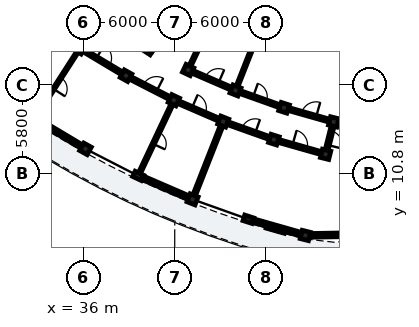
"""IFC4 building model, lengths in metres.
Left out: names, types, materials, properties, quantities, classifications, styles, units other than length and angle.
Written with IfcOpenShell. Run it as: python <this file> out.ifc"""

import sys

from ifc_helpers import new_model, si_unit, direction, frame, frame_2d, origin, origin_2d, place, context, subcontext, project, spatial, rectangle, extrude, element, fill, save


model = new_model("IFC4")
c1 = context("Model", 3, precision=1e-05, world=origin(), true_north=direction((0.0, 1.0)))
c2 = subcontext(c1, "Body", "Model", "MODEL_VIEW")
j1 = project(units=[si_unit("LENGTHUNIT", "METRE"), si_unit("PLANEANGLEUNIT", "RADIAN")], contexts=[c1])
p1 = place(None, origin())
s1 = spatial("IfcSite", under=j1, at=p1, CompositionType="ELEMENT")
p2 = place(p1, origin())
s2 = spatial("IfcBuilding", under=s1, at=p2, CompositionType="ELEMENT")
p3 = place(p2, frame((0.0, 0.0, 12.2)))
s3 = spatial("IfcBuildingStorey", under=s2, at=p3, CompositionType="ELEMENT", Elevation=12.2)
p4 = place(p3, frame((40.449, 18.709, 0.0), z_axis=(0.0, 0.0, 1.0), x_axis=(-0.838678407117, 0.544626963559, 0.0)))
e1 = element("IfcWall", 1, at=p4, inside=s3, PredefinedType="SHEAR", context=c2, shape_type="SweptSolid", body=[
    extrude(rectangle(XDim=3.42, YDim=0.25, at=frame_2d((1.71, 0.0))), origin(), (0.0, 0.0, 1.0), 3.11),
])
for number, where, z_axis, x_axis in (
    (2, (35.76, 19.042, 0.0), (0.0, 0.0, 1.0), (-0.541, -0.841, 0.0)),
    (3, (38.796, 17.227, 0.0), (0.0, 0.0, 1.0), (-0.485, -0.875, 0.0)),
    (4, (36.13, 12.417, 0.0), (0.0, 0.0, 1.0), (-0.485, -0.875, 0.0)),
    (5, (42.882, 17.604, 0.0), (0.0, 0.0, 1.0), (-0.427, -0.904, 0.0)),
    (6, (41.944, 15.614, 0.0), (0.0, 0.0, 1.0), (-0.427, -0.904, 0.0)),
):
    element("IfcColumn", number, at=place(p3, frame(where, z_axis=z_axis, x_axis=x_axis)), inside=s3, PredefinedType="COLUMN", context=c2, shape_type="SweptSolid", body=[
        extrude(rectangle(XDim=0.56, YDim=0.56, at=origin_2d()), origin(), (0.0, 0.0, 1.0), 3.105),
    ])
p5 = place(p3, frame((39.598, 10.64, 0.0), z_axis=(0.0, 0.0, 1.0), x_axis=(-0.426568739901, -0.904455145454, 0.0)))
e7 = element("IfcColumn", 7, at=p5, inside=s3, PredefinedType="PILASTER", context=c2, shape_type="SweptSolid", body=[
    extrude(rectangle(XDim=0.38, YDim=0.62, at=origin_2d()), origin(), (0.0, 0.0, 1.0), 3.105),
])
for number, where, z_axis, x_axis in (
    (8, (45.997, 16.258, 0.0), (0.0, 0.0, 1.0), (-0.367, -0.93, 0.0)),
    (9, (45.191, 14.211, 0.0), (0.0, 0.0, 1.0), (-0.367, -0.93, 0.0)),
    (10, (43.175, 9.094, 0.0), (0.0, 0.0, 1.0), (-0.367, -0.93, 0.0)),
    (11, (49.193, 15.118, 0.0), (0.0, 0.0, 1.0), (-0.305, -0.952, 0.0)),
    (12, (48.522, 13.023, 0.0), (0.0, 0.0, 1.0), (-0.305, -0.952, 0.0)),
):
    element("IfcColumn", number, at=place(p3, frame(where, z_axis=z_axis, x_axis=x_axis)), inside=s3, PredefinedType="COLUMN", context=c2, shape_type="SweptSolid", body=[
        extrude(rectangle(XDim=0.56, YDim=0.56, at=origin_2d()), origin(), (0.0, 0.0, 1.0), 3.105),
    ])
p6 = place(p3, frame((46.845, 7.785, 0.0), z_axis=(0.0, 0.0, 1.0), x_axis=(-0.304864299028, -0.952395799643, 0.0)))
e13 = element("IfcColumn", 13, at=p6, inside=s3, PredefinedType="PILASTER", context=c2, shape_type="SweptSolid", body=[
    extrude(rectangle(XDim=0.38, YDim=0.62, at=origin_2d()), origin(), (0.0, 0.0, 1.0), 3.105),
])
for number, where, z_axis, x_axis in (
    (14, (52.456, 14.19, 0.0), (0.0, 0.0, 1.0), (-0.242, -0.97, 0.0)),
    (15, (51.924, 12.055, 0.0), (0.0, 0.0, 1.0), (-0.242, -0.97, 0.0)),
    (16, (50.594, 6.719, 0.0), (0.0, 0.0, 1.0), (-0.242, -0.97, 0.0)),
):
    element("IfcColumn", number, at=place(p3, frame(where, z_axis=z_axis, x_axis=x_axis)), inside=s3, PredefinedType="COLUMN", context=c2, shape_type="SweptSolid", body=[
        extrude(rectangle(XDim=0.56, YDim=0.56, at=origin_2d()), origin(), (0.0, 0.0, 1.0), 3.105),
    ])
p7 = place(p3, frame((32.922, 14.334, 0.0), z_axis=(0.0, 0.0, 1.0), x_axis=(0.858288874148, -0.513166842766, 0.0)))
e17 = element("IfcWall", 17, at=p7, inside=s3, PredefinedType="SOLIDWALL", context=c2, shape_type="SweptSolid", body=[
    extrude(rectangle(XDim=3.487, YDim=0.245, at=frame_2d((1.743, 0.0))), origin(), (0.0, 0.0, 1.0), 2.355),
])
p8 = place(p7, frame((0.918, 0.0, 0.35)))
e18 = element("IfcOpeningElement", 18, at=p8, cuts=e17, PredefinedType="OPENING", context=c2, shape_type="SweptSolid", body=[
    extrude(rectangle(XDim=1.65, YDim=1.8, at=frame_2d((0.825, 0.9))), frame((0.0, 0.133, 0.0), z_axis=(0.0, -1.0, 0.0), x_axis=(1.0, 0.0, 0.0)), (0.0, 0.0, 1.0), 0.265),
])
p9 = place(p3, frame((39.745, 10.576, 0.0), z_axis=(0.0, 0.0, 1.0), x_axis=(0.917938367037, -0.396723019652, 0.0)))
e19 = element("IfcWall", 19, at=p9, inside=s3, PredefinedType="SOLIDWALL", context=c2, shape_type="SweptSolid", body=[
    extrude(rectangle(XDim=3.487, YDim=0.245, at=frame_2d((1.743, 0.0))), origin(), (0.0, 0.0, 1.0), 2.355),
])
p10 = place(p9, frame((1.104, 0.0, 0.55)))
e20 = element("IfcOpeningElement", 20, at=p10, cuts=e19, PredefinedType="OPENING", context=c2, shape_type="SweptSolid", body=[
    extrude(rectangle(XDim=1.28, YDim=1.52, at=frame_2d((0.64, 0.76))), frame((0.0, 0.133, 0.0), z_axis=(0.0, -1.0, 0.0), x_axis=(1.0, 0.0, 0.0)), (0.0, 0.0, 1.0), 0.265),
])
p11 = place(p3, frame((46.999, 7.741, 0.0), z_axis=(0.0, 0.0, 1.0), x_axis=(0.961871954212, -0.2735001713, 0.0)))
e21 = element("IfcWall", 21, at=p11, inside=s3, PredefinedType="SOLIDWALL", context=c2, shape_type="SweptSolid", body=[
    extrude(rectangle(XDim=3.487, YDim=0.245, at=frame_2d((1.743, 0.0))), origin(), (0.0, 0.0, 1.0), 2.355),
])
p12 = place(p11, frame((1.123, 0.0, 0.55)))
e22 = element("IfcOpeningElement", 22, at=p12, cuts=e21, PredefinedType="OPENING", context=c2, shape_type="SweptSolid", body=[
    extrude(rectangle(XDim=1.24, YDim=1.535, at=frame_2d((0.62, 0.768))), frame((0.0, 0.133, 0.0), z_axis=(0.0, -1.0, 0.0), x_axis=(1.0, 0.0, 0.0)), (0.0, 0.0, 1.0), 0.265),
])
p13 = place(p3, frame((54.501, 6.787, 0.0), z_axis=(0.0, 0.0, 1.0), x_axis=(-0.999848115368, -0.017428315893, 0.0)))
e23 = element("IfcWall", 23, at=p13, inside=s3, PredefinedType="SOLIDWALL", context=c2, shape_type="SweptSolid", body=[
    extrude(rectangle(XDim=3.908, YDim=0.245, at=frame_2d((1.954, 0.0))), origin(), (0.0, 0.0, 1.0), 2.355),
])
p14 = place(p13, frame((0.979, 0.0, 0.4)))
e24 = element("IfcOpeningElement", 24, at=p14, cuts=e23, PredefinedType="OPENING", context=c2, shape_type="SweptSolid", body=[
    extrude(rectangle(XDim=1.95, YDim=1.78, at=frame_2d((0.975, 0.89))), frame((0.0, 0.133, 0.0), z_axis=(0.0, -1.0, 0.0), x_axis=(1.0, 0.0, 0.0)), (0.0, 0.0, 1.0), 0.265),
])
p15 = place(p3, frame((35.544, 18.705, 0.0), z_axis=(0.0, 0.0, 1.0), x_axis=(-0.540959731567, -0.84104849374, 0.0)))
e25 = element("IfcWall", 25, at=p15, inside=s3, PredefinedType="PARTITIONING", context=c2, shape_type="SweptSolid", body=[
    extrude(rectangle(XDim=4.7, YDim=0.115, at=frame_2d((2.35, 0.0))), origin(), (0.0, 0.0, 1.0), 2.37),
])
p16 = place(p15, frame((1.905, 0.0, 0.0)))
e26 = element("IfcOpeningElement", 26, at=p16, cuts=e25, PredefinedType="OPENING", context=c2, shape_type="SweptSolid", body=[
    extrude(rectangle(XDim=0.89, YDim=2.1, at=frame_2d((0.445, 1.05))), frame((0.0, 0.067, 0.0), z_axis=(0.0, -1.0, 0.0), x_axis=(1.0, 0.0, 0.0)), (0.0, 0.0, 1.0), 0.135),
])
p17 = place(p3, frame((36.061, 18.862, 0.0), z_axis=(0.0, 0.0, 1.0), x_axis=(0.858281647443, -0.51317892948, 0.0)))
e27 = element("IfcWall", 27, at=p17, inside=s3, PredefinedType="PARTITIONING", context=c2, shape_type="SweptSolid", body=[
    extrude(rectangle(XDim=2.837, YDim=0.195, at=frame_2d((1.418, 0.0))), origin(), (0.0, 0.0, 1.0), 2.37),
])
p18 = place(p17, frame((0.924, 0.0, 0.0)))
e28 = element("IfcOpeningElement", 28, at=p18, cuts=e27, PredefinedType="OPENING", context=c2, shape_type="SweptSolid", body=[
    extrude(rectangle(XDim=0.99, YDim=2.16, at=frame_2d((0.495, 1.08))), frame((0.0, 0.107, 0.0), z_axis=(0.0, -1.0, 0.0), x_axis=(1.0, 0.0, 0.0)), (0.0, 0.0, 1.0), 0.215),
])
p19 = place(p3, frame((39.107, 17.067, 0.0), z_axis=(0.0, 0.0, 1.0), x_axis=(0.890030590607, -0.45590080915, 0.0)))
e29 = element("IfcWall", 29, at=p19, inside=s3, PredefinedType="PARTITIONING", context=c2, shape_type="SweptSolid", body=[
    extrude(rectangle(XDim=2.837, YDim=0.195, at=frame_2d((1.418, 0.0))), origin(), (0.0, 0.0, 1.0), 2.37),
])
p20 = place(p19, frame((0.934, 0.0, 0.0)))
e30 = element("IfcOpeningElement", 30, at=p20, cuts=e29, PredefinedType="OPENING", context=c2, shape_type="SweptSolid", body=[
    extrude(rectangle(XDim=0.97, YDim=2.15, at=frame_2d((0.485, 1.075))), frame((0.0, 0.107, 0.0), z_axis=(0.0, -1.0, 0.0), x_axis=(1.0, 0.0, 0.0)), (0.0, 0.0, 1.0), 0.215),
])
p21 = place(p3, frame((41.773, 15.252, 0.0), z_axis=(0.0, 0.0, 1.0), x_axis=(-0.426567365945, -0.904455793453, 0.0)))
e31 = element("IfcWall", 31, at=p21, inside=s3, PredefinedType="PLUMBINGWALL", context=c2, shape_type="SweptSolid", body=[
    extrude(rectangle(XDim=4.7, YDim=0.14, at=frame_2d((2.35, 0.0))), origin(), (0.0, 0.0, 1.0), 2.37),
])
p22 = place(p21, frame((1.925, 0.0, 0.0)))
e32 = element("IfcOpeningElement", 32, at=p22, cuts=e31, PredefinedType="OPENING", context=c2, shape_type="SweptSolid", body=[
    extrude(rectangle(XDim=0.85, YDim=2.05, at=frame_2d((0.425, 1.025))), frame((0.0, 0.08, 0.0), z_axis=(0.0, -1.0, 0.0), x_axis=(1.0, 0.0, 0.0)), (0.0, 0.0, 1.0), 0.16),
])
p23 = place(p3, frame((45.868, 23.935, 0.0), z_axis=(0.0, 0.0, 1.0), x_axis=(-0.426573573579, -0.904452865728, 0.0)))
e33 = element("IfcWall", 33, at=p23, inside=s3, PredefinedType="PARTITIONING", context=c2, shape_type="SweptSolid", body=[
    extrude(rectangle(XDim=6.6, YDim=0.125, at=frame_2d((3.3, 0.0))), origin(), (0.0, 0.0, 1.0), 2.37),
])
p24 = place(p23, frame((2.855, 0.0, 0.0)))
e34 = element("IfcOpeningElement", 34, at=p24, cuts=e33, PredefinedType="OPENING", context=c2, shape_type="SweptSolid", body=[
    extrude(rectangle(XDim=0.89, YDim=2.1, at=frame_2d((0.445, 1.05))), frame((0.0, 0.073, 0.0), z_axis=(0.0, -1.0, 0.0), x_axis=(1.0, 0.0, 0.0)), (0.0, 0.0, 1.0), 0.145),
])
p25 = place(p3, frame((42.265, 15.475, 0.0), z_axis=(0.0, 0.0, 1.0), x_axis=(0.917943439406, -0.396711282991, 0.0)))
e35 = element("IfcWall", 35, at=p25, inside=s3, PredefinedType="PARTITIONING", context=c2, shape_type="SweptSolid", body=[
    extrude(rectangle(XDim=2.837, YDim=0.195, at=frame_2d((1.418, 0.0))), origin(), (0.0, 0.0, 1.0), 2.37),
])
p26 = place(p25, frame((0.944, 0.0, 0.0)))
e36 = element("IfcOpeningElement", 36, at=p26, cuts=e35, PredefinedType="OPENING", context=c2, shape_type="SweptSolid", body=[
    extrude(rectangle(XDim=0.95, YDim=2.13, at=frame_2d((0.475, 1.065))), frame((0.0, 0.107, 0.0), z_axis=(0.0, -1.0, 0.0), x_axis=(1.0, 0.0, 0.0)), (0.0, 0.0, 1.0), 0.215),
])
p27 = place(p3, frame((43.204, 17.465, 0.0), z_axis=(0.0, 0.0, 1.0), x_axis=(0.91793557165, -0.39672948756, 0.0)))
e37 = element("IfcWall", 37, at=p27, inside=s3, PredefinedType="PARTITIONING", context=c2, shape_type="SweptSolid", body=[
    extrude(rectangle(XDim=2.693, YDim=0.195, at=frame_2d((1.346, 0.0))), origin(), (0.0, 0.0, 1.0), 2.37),
])
p28 = place(p27, frame((0.872, 0.0, 0.0)))
e38 = element("IfcOpeningElement", 38, at=p28, cuts=e37, PredefinedType="OPENING", context=c2, shape_type="SweptSolid", body=[
    extrude(rectangle(XDim=0.95, YDim=2.13, at=frame_2d((0.475, 1.065))), frame((0.0, 0.107, 0.0), z_axis=(0.0, -1.0, 0.0), x_axis=(1.0, 0.0, 0.0)), (0.0, 0.0, 1.0), 0.215),
])
p29 = place(p3, frame((45.044, 13.839, 0.0), z_axis=(0.0, 0.0, 1.0), x_axis=(-0.366468650514, -0.930430399434, 0.0)))
e39 = element("IfcWall", 39, at=p29, inside=s3, PredefinedType="PARTITIONING", context=c2, shape_type="SweptSolid", body=[
    extrude(rectangle(XDim=4.7, YDim=0.175, at=frame_2d((2.35, 0.0))), origin(), (0.0, 0.0, 1.0), 2.37),
])
p30 = place(p3, frame((48.562, 22.771, 0.0), z_axis=(0.0, 0.0, 1.0), x_axis=(-0.366512873936, -0.930412979939, 0.0)))
e40 = element("IfcWall", 40, at=p30, inside=s3, PredefinedType="PARTITIONING", context=c2, shape_type="SweptSolid", body=[
    extrude(rectangle(XDim=6.6, YDim=0.125, at=frame_2d((3.3, 0.0))), origin(), (0.0, 0.0, 1.0), 2.37),
])
p31 = place(p30, frame((2.865, 0.0, 0.0)))
e41 = element("IfcOpeningElement", 41, at=p31, cuts=e40, PredefinedType="OPENING", context=c2, shape_type="SweptSolid", body=[
    extrude(rectangle(XDim=0.87, YDim=2.08, at=frame_2d((0.435, 1.04))), frame((0.0, 0.073, 0.0), z_axis=(0.0, -1.0, 0.0), x_axis=(1.0, 0.0, 0.0)), (0.0, 0.0, 1.0), 0.145),
])
p32 = place(p3, frame((45.52, 14.093, 0.0), z_axis=(0.0, 0.0, 1.0), x_axis=(0.941930628611, -0.335807520589, 0.0)))
e42 = element("IfcWall", 42, at=p32, inside=s3, PredefinedType="PARTITIONING", context=c2, shape_type="SweptSolid", body=[
    extrude(rectangle(XDim=2.837, YDim=0.195, at=frame_2d((1.418, 0.0))), origin(), (0.0, 0.0, 1.0), 2.37),
])
p33 = place(p32, frame((0.954, 0.0, 0.0)))
e43 = element("IfcOpeningElement", 43, at=p33, cuts=e42, PredefinedType="OPENING", context=c2, shape_type="SweptSolid", body=[
    extrude(rectangle(XDim=0.93, YDim=2.12, at=frame_2d((0.465, 1.06))), frame((0.0, 0.107, 0.0), z_axis=(0.0, -1.0, 0.0), x_axis=(1.0, 0.0, 0.0)), (0.0, 0.0, 1.0), 0.215),
])
p34 = place(p3, frame((46.327, 16.14, 0.0), z_axis=(0.0, 0.0, 1.0), x_axis=(0.941895652647, -0.335905611036, 0.0)))
e44 = element("IfcWall", 44, at=p34, inside=s3, PredefinedType="PARTITIONING", context=c2, shape_type="SweptSolid", body=[
    extrude(rectangle(XDim=2.693, YDim=0.195, at=frame_2d((1.346, 0.0))), origin(), (0.0, 0.0, 1.0), 2.37),
])
p35 = place(p34, frame((0.882, 0.0, 0.0)))
e45 = element("IfcOpeningElement", 45, at=p35, cuts=e44, PredefinedType="OPENING", context=c2, shape_type="SweptSolid", body=[
    extrude(rectangle(XDim=0.93, YDim=2.12, at=frame_2d((0.465, 1.06))), frame((0.0, 0.107, 0.0), z_axis=(0.0, -1.0, 0.0), x_axis=(1.0, 0.0, 0.0)), (0.0, 0.0, 1.0), 0.215),
])
p36 = place(p3, frame((48.859, 12.927, 0.0), z_axis=(0.0, 0.0, 1.0), x_axis=(0.961873892319, -0.273493355085, 0.0)))
e46 = element("IfcWall", 46, at=p36, inside=s3, PredefinedType="PARTITIONING", context=c2, shape_type="SweptSolid", body=[
    extrude(rectangle(XDim=2.837, YDim=0.195, at=frame_2d((1.418, 0.0))), origin(), (0.0, 0.0, 1.0), 2.37),
])
p37 = place(p36, frame((0.924, 0.0, 0.0)))
e47 = element("IfcOpeningElement", 47, at=p37, cuts=e46, PredefinedType="OPENING", context=c2, shape_type="SweptSolid", body=[
    extrude(rectangle(XDim=0.99, YDim=2.16, at=frame_2d((0.495, 1.08))), frame((0.0, 0.107, 0.0), z_axis=(0.0, -1.0, 0.0), x_axis=(1.0, 0.0, 0.0)), (0.0, 0.0, 1.0), 0.215),
])
p38 = place(p3, frame((49.53, 15.022, 0.0), z_axis=(0.0, 0.0, 1.0), x_axis=(0.961861926514, -0.273535435224, 0.0)))
e48 = element("IfcWall", 48, at=p38, inside=s3, PredefinedType="PARTITIONING", context=c2, shape_type="SweptSolid", body=[
    extrude(rectangle(XDim=2.693, YDim=0.195, at=frame_2d((1.346, 0.0))), origin(), (0.0, 0.0, 1.0), 2.37),
])
p39 = place(p38, frame((0.852, 0.0, 0.0)))
e49 = element("IfcOpeningElement", 49, at=p39, cuts=e48, PredefinedType="OPENING", context=c2, shape_type="SweptSolid", body=[
    extrude(rectangle(XDim=0.99, YDim=2.16, at=frame_2d((0.495, 1.08))), frame((0.0, 0.107, 0.0), z_axis=(0.0, -1.0, 0.0), x_axis=(1.0, 0.0, 0.0)), (0.0, 0.0, 1.0), 0.215),
])
p40 = place(p3, frame((52.444, 14.142, 0.0), z_axis=(0.0, 0.0, 1.0), x_axis=(-0.241933770084, -0.970292765557, 0.0)))
e50 = element("IfcWall", 50, at=p40, inside=s3, PredefinedType="PARTITIONING", context=c2, shape_type="SweptSolid", body=[
    extrude(rectangle(XDim=2.1, YDim=0.195, at=frame_2d((1.05, 0.0))), origin(), (0.0, 0.0, 1.0), 2.37),
])
p41 = place(p40, frame((0.57, 0.0, 0.0)))
e51 = element("IfcOpeningElement", 51, at=p41, cuts=e50, PredefinedType="OPENING", context=c2, shape_type="SweptSolid", body=[
    extrude(rectangle(XDim=0.95, YDim=2.13, at=frame_2d((0.475, 1.065))), frame((0.0, 0.107, 0.0), z_axis=(0.0, -1.0, 0.0), x_axis=(1.0, 0.0, 0.0)), (0.0, 0.0, 1.0), 0.215),
])
p42 = place(p8, origin())
e52 = element("IfcWindow", 52, at=p42, inside=s3, PartitioningType="SINGLE_PANEL", PredefinedType="WINDOW", context=c2, shape_type="SweptSolid", body=[
    extrude(rectangle(XDim=1.65, YDim=1.8, at=frame_2d((0.825, 0.9))), frame((0.0, 0.03, 0.0), z_axis=(0.0, -1.0, 0.0), x_axis=(1.0, 0.0, 0.0)), (0.0, 0.0, 1.0), 0.06),
])
fill(e18, e52)
p43 = place(p10, origin())
e53 = element("IfcWindow", 53, at=p43, inside=s3, PartitioningType="SINGLE_PANEL", PredefinedType="WINDOW", context=c2, shape_type="SweptSolid", body=[
    extrude(rectangle(XDim=1.28, YDim=1.52, at=frame_2d((0.64, 0.76))), frame((0.0, 0.03, 0.0), z_axis=(0.0, -1.0, 0.0), x_axis=(1.0, 0.0, 0.0)), (0.0, 0.0, 1.0), 0.06),
])
fill(e20, e53)
p44 = place(p12, origin())
e54 = element("IfcWindow", 54, at=p44, inside=s3, PartitioningType="SINGLE_PANEL", PredefinedType="WINDOW", context=c2, shape_type="SweptSolid", body=[
    extrude(rectangle(XDim=1.24, YDim=1.535, at=frame_2d((0.62, 0.768))), frame((0.0, 0.03, 0.0), z_axis=(0.0, -1.0, 0.0), x_axis=(1.0, 0.0, 0.0)), (0.0, 0.0, 1.0), 0.06),
])
fill(e22, e54)
p45 = place(p14, origin())
e55 = element("IfcWindow", 55, at=p45, inside=s3, PartitioningType="SINGLE_PANEL", PredefinedType="WINDOW", context=c2, shape_type="SweptSolid", body=[
    extrude(rectangle(XDim=1.95, YDim=1.78, at=frame_2d((0.975, 0.89))), frame((0.0, 0.03, 0.0), z_axis=(0.0, -1.0, 0.0), x_axis=(1.0, 0.0, 0.0)), (0.0, 0.0, 1.0), 0.06),
])
fill(e24, e55)
p46 = place(p16, origin())
e56 = element("IfcDoor", 56, at=p46, inside=s3, OperationType="SINGLE_SWING_RIGHT", PredefinedType="DOOR", context=c2, shape_type="SweptSolid", body=[
    extrude(rectangle(XDim=0.89, YDim=2.1, at=frame_2d((0.445, 1.05))), frame((0.0, 0.025, 0.0), z_axis=(0.0, -1.0, 0.0), x_axis=(1.0, 0.0, 0.0)), (0.0, 0.0, 1.0), 0.05),
])
fill(e26, e56)
p47 = place(p18, origin())
e57 = element("IfcDoor", 57, at=p47, inside=s3, OperationType="SINGLE_SWING_LEFT", PredefinedType="DOOR", context=c2, shape_type="SweptSolid", body=[
    extrude(rectangle(XDim=0.99, YDim=2.16, at=frame_2d((0.495, 1.08))), frame((0.0, 0.025, 0.0), z_axis=(0.0, -1.0, 0.0), x_axis=(1.0, 0.0, 0.0)), (0.0, 0.0, 1.0), 0.05),
])
fill(e28, e57)
p48 = place(p20, origin())
e58 = element("IfcDoor", 58, at=p48, inside=s3, OperationType="SINGLE_SWING_RIGHT", PredefinedType="DOOR", context=c2, shape_type="SweptSolid", body=[
    extrude(rectangle(XDim=0.97, YDim=2.15, at=frame_2d((0.485, 1.075))), frame((0.0, 0.025, 0.0), z_axis=(0.0, -1.0, 0.0), x_axis=(1.0, 0.0, 0.0)), (0.0, 0.0, 1.0), 0.05),
])
fill(e30, e58)
p49 = place(p22, origin())
e59 = element("IfcDoor", 59, at=p49, inside=s3, OperationType="SINGLE_SWING_RIGHT", PredefinedType="DOOR", context=c2, shape_type="SweptSolid", body=[
    extrude(rectangle(XDim=0.85, YDim=2.05, at=frame_2d((0.425, 1.025))), frame((0.0, 0.025, 0.0), z_axis=(0.0, -1.0, 0.0), x_axis=(1.0, 0.0, 0.0)), (0.0, 0.0, 1.0), 0.05),
])
fill(e32, e59)
p50 = place(p26, origin())
e60 = element("IfcDoor", 60, at=p50, inside=s3, OperationType="SINGLE_SWING_LEFT", PredefinedType="DOOR", context=c2, shape_type="SweptSolid", body=[
    extrude(rectangle(XDim=0.95, YDim=2.13, at=frame_2d((0.475, 1.065))), frame((0.0, 0.025, 0.0), z_axis=(0.0, -1.0, 0.0), x_axis=(1.0, 0.0, 0.0)), (0.0, 0.0, 1.0), 0.05),
])
fill(e36, e60)
p51 = place(p28, origin())
e61 = element("IfcDoor", 61, at=p51, inside=s3, OperationType="SINGLE_SWING_RIGHT", PredefinedType="DOOR", context=c2, shape_type="SweptSolid", body=[
    extrude(rectangle(XDim=0.95, YDim=2.13, at=frame_2d((0.475, 1.065))), frame((0.0, 0.025, 0.0), z_axis=(0.0, -1.0, 0.0), x_axis=(1.0, 0.0, 0.0)), (0.0, 0.0, 1.0), 0.05),
])
fill(e38, e61)
p52 = place(p33, origin())
e62 = element("IfcDoor", 62, at=p52, inside=s3, OperationType="SINGLE_SWING_RIGHT", PredefinedType="DOOR", context=c2, shape_type="SweptSolid", body=[
    extrude(rectangle(XDim=0.93, YDim=2.12, at=frame_2d((0.465, 1.06))), frame((0.0, 0.025, 0.0), z_axis=(0.0, -1.0, 0.0), x_axis=(1.0, 0.0, 0.0)), (0.0, 0.0, 1.0), 0.05),
])
fill(e43, e62)
p53 = place(p35, origin())
e63 = element("IfcDoor", 63, at=p53, inside=s3, OperationType="SINGLE_SWING_LEFT", PredefinedType="DOOR", context=c2, shape_type="SweptSolid", body=[
    extrude(rectangle(XDim=0.93, YDim=2.12, at=frame_2d((0.465, 1.06))), frame((0.0, 0.025, 0.0), z_axis=(0.0, -1.0, 0.0), x_axis=(1.0, 0.0, 0.0)), (0.0, 0.0, 1.0), 0.05),
])
fill(e45, e63)
p54 = place(p37, origin())
e64 = element("IfcDoor", 64, at=p54, inside=s3, OperationType="SINGLE_SWING_LEFT", PredefinedType="DOOR", context=c2, shape_type="SweptSolid", body=[
    extrude(rectangle(XDim=0.99, YDim=2.16, at=frame_2d((0.495, 1.08))), frame((0.0, 0.025, 0.0), z_axis=(0.0, -1.0, 0.0), x_axis=(1.0, 0.0, 0.0)), (0.0, 0.0, 1.0), 0.05),
])
fill(e47, e64)
p55 = place(p39, origin())
e65 = element("IfcDoor", 65, at=p55, inside=s3, OperationType="SINGLE_SWING_RIGHT", PredefinedType="DOOR", context=c2, shape_type="SweptSolid", body=[
    extrude(rectangle(XDim=0.99, YDim=2.16, at=frame_2d((0.495, 1.08))), frame((0.0, 0.025, 0.0), z_axis=(0.0, -1.0, 0.0), x_axis=(1.0, 0.0, 0.0)), (0.0, 0.0, 1.0), 0.05),
])
fill(e49, e65)
p56 = place(p41, origin())
e66 = element("IfcDoor", 66, at=p56, inside=s3, OperationType="SINGLE_SWING_RIGHT", PredefinedType="DOOR", context=c2, shape_type="SweptSolid", body=[
    extrude(rectangle(XDim=0.95, YDim=2.13, at=frame_2d((0.475, 1.065))), frame((0.0, 0.025, 0.0), z_axis=(0.0, -1.0, 0.0), x_axis=(1.0, 0.0, 0.0)), (0.0, 0.0, 1.0), 0.05),
])
fill(e51, e66)
save(model, sys.argv[1])
